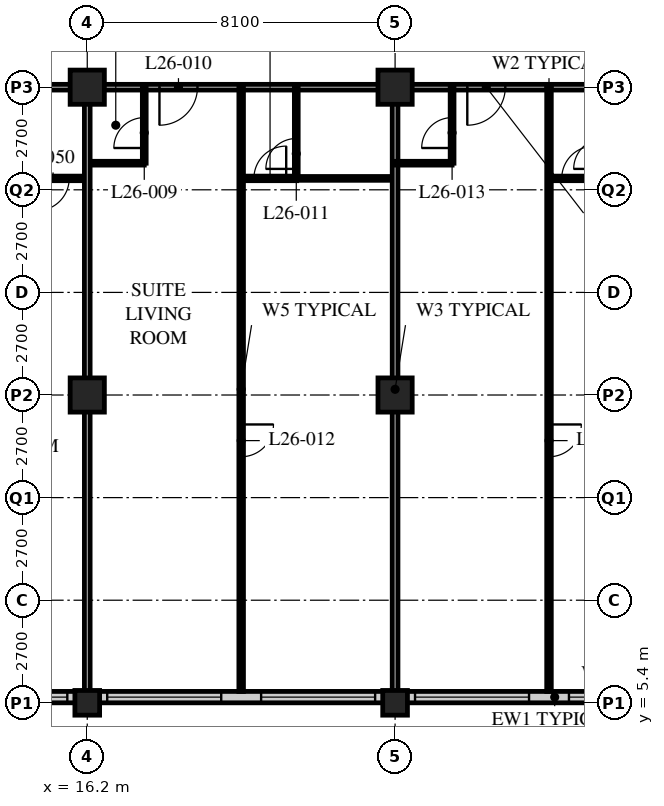
"""IFC4 building model, lengths in metres.
Left out: names, types, materials, properties, quantities, classifications, styles, units other than length and angle.
Written with IfcOpenShell. Run it as: python <this file> out.ifc"""

import sys

from ifc_helpers import new_model, si_unit, direction, frame, frame_2d, origin, origin_2d, place, context, subcontext, project, spatial, rectangle, hollow_rectangle, extrude, element, fill, save


model = new_model("IFC4")
c1 = context("Model", 3, precision=1e-05, world=origin(), true_north=direction((0.0, 1.0)))
c2 = subcontext(c1, "Body", "Model", "MODEL_VIEW")
j1 = project(units=[si_unit("LENGTHUNIT", "METRE"), si_unit("PLANEANGLEUNIT", "RADIAN")], contexts=[c1])
p1 = place(None, origin())
s1 = spatial("IfcSite", under=j1, at=p1, CompositionType="ELEMENT")
p2 = place(p1, origin())
s2 = spatial("IfcBuilding", under=s1, at=p2, CompositionType="ELEMENT")
p3 = place(p2, frame((0.0, 0.0, 106.8)))
s3 = spatial("IfcBuildingStorey", under=s2, at=p3, CompositionType="ELEMENT", Elevation=106.8)
p4 = place(p3, frame((16.2, 5.4, 0.0), z_axis=(0.0, 0.0, 1.0), x_axis=(1.0, 0.0, 0.0)))
e1 = element("IfcColumn", 1, at=p4, inside=s3, PredefinedType="COLUMN", context=c2, shape_type="SweptSolid", body=[
    extrude(hollow_rectangle(XDim=0.65, YDim=0.65, WallThickness=0.055, at=origin_2d()), origin(), (0.0, 0.0, 1.0), 3.4),
])
for number, where, z_axis, x_axis in (
    (2, (16.2, 13.5, 0.0), (0.0, 0.0, 1.0), (1.0, 0.0, 0.0)),
    (3, (16.2, 21.6, 0.0), (0.0, 0.0, 1.0), (1.0, 0.0, 0.0)),
):
    element("IfcColumn", number, at=place(p3, frame(where, z_axis=z_axis, x_axis=x_axis)), inside=s3, PredefinedType="COLUMN", context=c2, shape_type="SweptSolid", body=[
        extrude(hollow_rectangle(XDim=0.9, YDim=0.9, WallThickness=0.09, at=origin_2d()), origin(), (0.0, 0.0, 1.0), 3.4),
    ])
p5 = place(p3, frame((24.3, 5.4, 0.0), z_axis=(0.0, 0.0, 1.0), x_axis=(1.0, 0.0, 0.0)))
e4 = element("IfcColumn", 4, at=p5, inside=s3, PredefinedType="COLUMN", context=c2, shape_type="SweptSolid", body=[
    extrude(hollow_rectangle(XDim=0.65, YDim=0.65, WallThickness=0.055, at=origin_2d()), origin(), (0.0, 0.0, 1.0), 3.4),
])
for number, where, z_axis, x_axis in (
    (5, (24.3, 13.5, 0.0), (0.0, 0.0, 1.0), (1.0, 0.0, 0.0)),
    (6, (24.3, 21.6, 0.0), (0.0, 0.0, 1.0), (1.0, 0.0, 0.0)),
):
    element("IfcColumn", number, at=place(p3, frame(where, z_axis=z_axis, x_axis=x_axis)), inside=s3, PredefinedType="COLUMN", context=c2, shape_type="SweptSolid", body=[
        extrude(hollow_rectangle(XDim=0.9, YDim=0.9, WallThickness=0.09, at=origin_2d()), origin(), (0.0, 0.0, 1.0), 3.4),
    ])
p6 = place(p3, frame((8.4, 5.55, 0.0), z_axis=(0.0, 0.0, 1.0), x_axis=(1.0, 0.0, 0.0)))
e7 = element("IfcWall", 7, at=p6, inside=s3, PredefinedType="SOLIDWALL", context=c2, shape_type="SweptSolid", body=[
    extrude(rectangle(XDim=40.2, YDim=0.3, at=frame_2d((20.1, 0.0))), origin(), (0.0, 0.0, 1.0), 3.19),
])
p7 = place(p6, frame((0.225, 0.0, 0.9)))
e8 = element("IfcOpeningElement", 8, at=p7, cuts=e7, PredefinedType="OPENING", context=c2, shape_type="SweptSolid", body=[
    extrude(rectangle(XDim=3.0, YDim=2.0, at=frame_2d((1.5, 1.0))), frame((0.0, 0.16, 0.0), z_axis=(0.0, -1.0, 0.0), x_axis=(1.0, 0.0, 0.0)), (0.0, 0.0, 1.0), 0.32),
])
p8 = place(p6, frame((4.275, 0.0, 0.9)))
e9 = element("IfcOpeningElement", 9, at=p8, cuts=e7, PredefinedType="OPENING", context=c2, shape_type="SweptSolid", body=[
    extrude(rectangle(XDim=3.0, YDim=2.0, at=frame_2d((1.5, 1.0))), frame((0.0, 0.16, 0.0), z_axis=(0.0, -1.0, 0.0), x_axis=(1.0, 0.0, 0.0)), (0.0, 0.0, 1.0), 0.32),
])
p9 = place(p6, frame((8.325, 0.0, 0.9)))
e10 = element("IfcOpeningElement", 10, at=p9, cuts=e7, PredefinedType="OPENING", context=c2, shape_type="SweptSolid", body=[
    extrude(rectangle(XDim=3.0, YDim=2.0, at=frame_2d((1.5, 1.0))), frame((0.0, 0.16, 0.0), z_axis=(0.0, -1.0, 0.0), x_axis=(1.0, 0.0, 0.0)), (0.0, 0.0, 1.0), 0.32),
])
p10 = place(p6, frame((12.375, 0.0, 0.9)))
e11 = element("IfcOpeningElement", 11, at=p10, cuts=e7, PredefinedType="OPENING", context=c2, shape_type="SweptSolid", body=[
    extrude(rectangle(XDim=3.0, YDim=2.0, at=frame_2d((1.5, 1.0))), frame((0.0, 0.16, 0.0), z_axis=(0.0, -1.0, 0.0), x_axis=(1.0, 0.0, 0.0)), (0.0, 0.0, 1.0), 0.32),
])
p11 = place(p6, frame((16.425, 0.0, 0.9)))
e12 = element("IfcOpeningElement", 12, at=p11, cuts=e7, PredefinedType="OPENING", context=c2, shape_type="SweptSolid", body=[
    extrude(rectangle(XDim=3.0, YDim=2.0, at=frame_2d((1.5, 1.0))), frame((0.0, 0.16, 0.0), z_axis=(0.0, -1.0, 0.0), x_axis=(1.0, 0.0, 0.0)), (0.0, 0.0, 1.0), 0.32),
])
p12 = place(p6, frame((20.475, 0.0, 0.9)))
e13 = element("IfcOpeningElement", 13, at=p12, cuts=e7, PredefinedType="OPENING", context=c2, shape_type="SweptSolid", body=[
    extrude(rectangle(XDim=3.0, YDim=2.0, at=frame_2d((1.5, 1.0))), frame((0.0, 0.16, 0.0), z_axis=(0.0, -1.0, 0.0), x_axis=(1.0, 0.0, 0.0)), (0.0, 0.0, 1.0), 0.32),
])
p13 = place(p6, frame((24.525, 0.0, 0.9)))
e14 = element("IfcOpeningElement", 14, at=p13, cuts=e7, PredefinedType="OPENING", context=c2, shape_type="SweptSolid", body=[
    extrude(rectangle(XDim=3.0, YDim=2.0, at=frame_2d((1.5, 1.0))), frame((0.0, 0.16, 0.0), z_axis=(0.0, -1.0, 0.0), x_axis=(1.0, 0.0, 0.0)), (0.0, 0.0, 1.0), 0.32),
])
p14 = place(p6, frame((28.575, 0.0, 0.9)))
e15 = element("IfcOpeningElement", 15, at=p14, cuts=e7, PredefinedType="OPENING", context=c2, shape_type="SweptSolid", body=[
    extrude(rectangle(XDim=3.0, YDim=2.0, at=frame_2d((1.5, 1.0))), frame((0.0, 0.16, 0.0), z_axis=(0.0, -1.0, 0.0), x_axis=(1.0, 0.0, 0.0)), (0.0, 0.0, 1.0), 0.32),
])
p15 = place(p6, frame((32.625, 0.0, 0.9)))
e16 = element("IfcOpeningElement", 16, at=p15, cuts=e7, PredefinedType="OPENING", context=c2, shape_type="SweptSolid", body=[
    extrude(rectangle(XDim=3.0, YDim=2.0, at=frame_2d((1.5, 1.0))), frame((0.0, 0.16, 0.0), z_axis=(0.0, -1.0, 0.0), x_axis=(1.0, 0.0, 0.0)), (0.0, 0.0, 1.0), 0.32),
])
p16 = place(p6, frame((36.675, 0.0, 0.9)))
e17 = element("IfcOpeningElement", 17, at=p16, cuts=e7, PredefinedType="OPENING", context=c2, shape_type="SweptSolid", body=[
    extrude(rectangle(XDim=3.0, YDim=2.0, at=frame_2d((1.5, 1.0))), frame((0.0, 0.16, 0.0), z_axis=(0.0, -1.0, 0.0), x_axis=(1.0, 0.0, 0.0)), (0.0, 0.0, 1.0), 0.32),
])
p17 = place(p3, frame((12.15, 21.6, 0.0), z_axis=(0.0, 0.0, 1.0), x_axis=(1.0, 0.0, 0.0)))
e18 = element("IfcWall", 18, at=p17, inside=s3, PredefinedType="PARTITIONING", context=c2, shape_type="SweptSolid", body=[
    extrude(rectangle(XDim=32.4, YDim=0.15, at=frame_2d((16.2, 0.0))), origin(), (0.0, 0.0, 1.0), 2.578),
])
p18 = place(p17, frame((5.95, 0.0, 0.0)))
e19 = element("IfcOpeningElement", 19, at=p18, cuts=e18, PredefinedType="OPENING", context=c2, shape_type="SweptSolid", body=[
    extrude(rectangle(XDim=1.0, YDim=2.1, at=frame_2d((0.5, 1.05))), frame((0.0, 0.085, 0.0), z_axis=(0.0, -1.0, 0.0), x_axis=(1.0, 0.0, 0.0)), (0.0, 0.0, 1.0), 0.17),
])
p19 = place(p17, frame((14.05, 0.0, 0.0)))
e20 = element("IfcOpeningElement", 20, at=p19, cuts=e18, PredefinedType="OPENING", context=c2, shape_type="SweptSolid", body=[
    extrude(rectangle(XDim=1.0, YDim=2.1, at=frame_2d((0.5, 1.05))), frame((0.0, 0.085, 0.0), z_axis=(0.0, -1.0, 0.0), x_axis=(1.0, 0.0, 0.0)), (0.0, 0.0, 1.0), 0.17),
])
p20 = place(p17, frame((22.15, 0.0, 0.0)))
e21 = element("IfcOpeningElement", 21, at=p20, cuts=e18, PredefinedType="OPENING", context=c2, shape_type="SweptSolid", body=[
    extrude(rectangle(XDim=1.0, YDim=2.1, at=frame_2d((0.5, 1.05))), frame((0.0, 0.085, 0.0), z_axis=(0.0, -1.0, 0.0), x_axis=(1.0, 0.0, 0.0)), (0.0, 0.0, 1.0), 0.17),
])
p21 = place(p17, frame((1.525, 0.0, 0.0)))
e22 = element("IfcOpeningElement", 22, at=p21, cuts=e18, PredefinedType="OPENING", context=c2, shape_type="SweptSolid", body=[
    extrude(rectangle(XDim=1.0, YDim=2.1, at=frame_2d((0.5, 1.05))), frame((0.0, 0.085, 0.0), z_axis=(0.0, -1.0, 0.0), x_axis=(1.0, 0.0, 0.0)), (0.0, 0.0, 1.0), 0.17),
])
p22 = place(p17, frame((29.875, 0.0, 0.0)))
e23 = element("IfcOpeningElement", 23, at=p22, cuts=e18, PredefinedType="OPENING", context=c2, shape_type="SweptSolid", body=[
    extrude(rectangle(XDim=1.0, YDim=2.1, at=frame_2d((0.5, 1.05))), frame((0.0, 0.085, 0.0), z_axis=(0.0, -1.0, 0.0), x_axis=(1.0, 0.0, 0.0)), (0.0, 0.0, 1.0), 0.17),
])
p23 = place(p3, frame((16.2, 19.6, 0.0), z_axis=(0.0, 0.0, 1.0), x_axis=(1.0, 0.0, 0.0)))
e24 = element("IfcWall", 24, at=p23, inside=s3, PredefinedType="PARTITIONING", context=c2, shape_type="SweptSolid", body=[
    extrude(rectangle(XDim=1.5, YDim=0.1, at=frame_2d((0.75, 0.0))), origin(), (0.0, 0.0, 1.0), 3.19),
])
p24 = place(p3, frame((17.7, 21.6, 0.0), z_axis=(0.0, 0.0, 1.0), x_axis=(0.0, -1.0, 0.0)))
e25 = element("IfcWall", 25, at=p24, inside=s3, PredefinedType="PARTITIONING", context=c2, shape_type="SweptSolid", body=[
    extrude(rectangle(XDim=2.0, YDim=0.1, at=frame_2d((1.0, 0.0))), origin(), (0.0, 0.0, 1.0), 3.19),
])
p25 = place(p24, frame((0.8, 0.0, 0.0)))
e26 = element("IfcOpeningElement", 26, at=p25, cuts=e25, PredefinedType="OPENING", context=c2, shape_type="SweptSolid", body=[
    extrude(rectangle(XDim=0.8, YDim=2.1, at=frame_2d((0.4, 1.05))), frame((0.0, 0.06, 0.0), z_axis=(0.0, -1.0, 0.0), x_axis=(1.0, 0.0, 0.0)), (0.0, 0.0, 1.0), 0.12),
])
p26 = place(p3, frame((21.7, 19.2, 0.0), z_axis=(0.0, 0.0, 1.0), x_axis=(1.0, 0.0, 0.0)))
e27 = element("IfcWall", 27, at=p26, inside=s3, PredefinedType="PARTITIONING", context=c2, shape_type="SweptSolid", body=[
    extrude(rectangle(XDim=2.6, YDim=0.1, at=frame_2d((1.3, 0.0))), origin(), (0.0, 0.0, 1.0), 3.19),
])
p27 = place(p3, frame((21.7, 21.6, 0.0), z_axis=(0.0, 0.0, 1.0), x_axis=(0.0, -1.0, 0.0)))
e28 = element("IfcWall", 28, at=p27, inside=s3, PredefinedType="PARTITIONING", context=c2, shape_type="SweptSolid", body=[
    extrude(rectangle(XDim=2.4, YDim=0.1, at=frame_2d((1.2, 0.0))), origin(), (0.0, 0.0, 1.0), 3.19),
])
p28 = place(p27, frame((1.35, 0.0, 0.0)))
e29 = element("IfcOpeningElement", 29, at=p28, cuts=e28, PredefinedType="OPENING", context=c2, shape_type="SweptSolid", body=[
    extrude(rectangle(XDim=0.8, YDim=2.1, at=frame_2d((0.4, 1.05))), frame((0.0, 0.06, 0.0), z_axis=(0.0, -1.0, 0.0), x_axis=(1.0, 0.0, 0.0)), (0.0, 0.0, 1.0), 0.12),
])
p29 = place(p3, frame((20.25, 21.6, 0.0), z_axis=(0.0, 0.0, 1.0), x_axis=(0.0, -1.0, 0.0)))
e30 = element("IfcWall", 30, at=p29, inside=s3, PredefinedType="PARTITIONING", context=c2, shape_type="SweptSolid", body=[
    extrude(rectangle(XDim=15.9, YDim=0.12, at=frame_2d((7.95, 0.0))), origin(), (0.0, 0.0, 1.0), 3.19),
])
p30 = place(p29, frame((8.875, 0.0, 0.0)))
e31 = element("IfcOpeningElement", 31, at=p30, cuts=e30, PredefinedType="OPENING", context=c2, shape_type="SweptSolid", body=[
    extrude(rectangle(XDim=0.85, YDim=2.1, at=frame_2d((0.425, 1.05))), frame((0.0, 0.07, 0.0), z_axis=(0.0, -1.0, 0.0), x_axis=(1.0, 0.0, 0.0)), (0.0, 0.0, 1.0), 0.14),
])
p31 = place(p3, frame((24.3, 21.6, 0.0), z_axis=(0.0, 0.0, 1.0), x_axis=(0.0, -1.0, 0.0)))
e32 = element("IfcWall", 32, at=p31, inside=s3, PredefinedType="PARTITIONING", context=c2, shape_type="SweptSolid", body=[
    extrude(rectangle(XDim=15.9, YDim=0.15, at=frame_2d((7.95, 0.0))), origin(), (0.0, 0.0, 1.0), 2.578),
])
p32 = place(p3, frame((24.3, 19.6, 0.0), z_axis=(0.0, 0.0, 1.0), x_axis=(1.0, 0.0, 0.0)))
e33 = element("IfcWall", 33, at=p32, inside=s3, PredefinedType="PARTITIONING", context=c2, shape_type="SweptSolid", body=[
    extrude(rectangle(XDim=1.5, YDim=0.1, at=frame_2d((0.75, 0.0))), origin(), (0.0, 0.0, 1.0), 3.19),
])
p33 = place(p3, frame((25.8, 21.6, 0.0), z_axis=(0.0, 0.0, 1.0), x_axis=(0.0, -1.0, 0.0)))
e34 = element("IfcWall", 34, at=p33, inside=s3, PredefinedType="PARTITIONING", context=c2, shape_type="SweptSolid", body=[
    extrude(rectangle(XDim=2.0, YDim=0.1, at=frame_2d((1.0, 0.0))), origin(), (0.0, 0.0, 1.0), 3.19),
])
p34 = place(p33, frame((0.8, 0.0, 0.0)))
e35 = element("IfcOpeningElement", 35, at=p34, cuts=e34, PredefinedType="OPENING", context=c2, shape_type="SweptSolid", body=[
    extrude(rectangle(XDim=0.8, YDim=2.1, at=frame_2d((0.4, 1.05))), frame((0.0, 0.06, 0.0), z_axis=(0.0, -1.0, 0.0), x_axis=(1.0, 0.0, 0.0)), (0.0, 0.0, 1.0), 0.12),
])
p35 = place(p3, frame((28.35, 21.6, 0.0), z_axis=(0.0, 0.0, 1.0), x_axis=(0.0, -1.0, 0.0)))
e36 = element("IfcWall", 36, at=p35, inside=s3, PredefinedType="PARTITIONING", context=c2, shape_type="SweptSolid", body=[
    extrude(rectangle(XDim=15.9, YDim=0.12, at=frame_2d((7.95, 0.0))), origin(), (0.0, 0.0, 1.0), 3.19),
])
p36 = place(p35, frame((8.875, 0.0, 0.0)))
e37 = element("IfcOpeningElement", 37, at=p36, cuts=e36, PredefinedType="OPENING", context=c2, shape_type="SweptSolid", body=[
    extrude(rectangle(XDim=0.85, YDim=2.1, at=frame_2d((0.425, 1.05))), frame((0.0, 0.07, 0.0), z_axis=(0.0, -1.0, 0.0), x_axis=(1.0, 0.0, 0.0)), (0.0, 0.0, 1.0), 0.14),
])
p37 = place(p3, frame((8.15, 19.2, 0.0), z_axis=(0.0, 0.0, 1.0), x_axis=(1.0, 0.0, 0.0)))
e38 = element("IfcWall", 38, at=p37, inside=s3, PredefinedType="PARTITIONING", context=c2, shape_type="SweptSolid", body=[
    extrude(rectangle(XDim=8.05, YDim=0.12, at=frame_2d((4.025, 0.0))), origin(), (0.0, 0.0, 1.0), 3.19),
])
p38 = place(p37, frame((6.725, 0.0, 0.0)))
e39 = element("IfcOpeningElement", 39, at=p38, cuts=e38, PredefinedType="OPENING", context=c2, shape_type="SweptSolid", body=[
    extrude(rectangle(XDim=0.85, YDim=2.1, at=frame_2d((0.425, 1.05))), frame((0.0, 0.07, 0.0), z_axis=(0.0, -1.0, 0.0), x_axis=(1.0, 0.0, 0.0)), (0.0, 0.0, 1.0), 0.14),
])
p39 = place(p37, frame((2.875, 0.0, 0.0)))
e40 = element("IfcOpeningElement", 40, at=p39, cuts=e38, PredefinedType="OPENING", context=c2, shape_type="SweptSolid", body=[
    extrude(rectangle(XDim=0.85, YDim=2.1, at=frame_2d((0.425, 1.05))), frame((0.0, 0.07, 0.0), z_axis=(0.0, -1.0, 0.0), x_axis=(1.0, 0.0, 0.0)), (0.0, 0.0, 1.0), 0.14),
])
p40 = place(p3, frame((16.2, 21.6, 0.0), z_axis=(0.0, 0.0, 1.0), x_axis=(0.0, -1.0, 0.0)))
e41 = element("IfcWall", 41, at=p40, inside=s3, PredefinedType="PARTITIONING", context=c2, shape_type="SweptSolid", body=[
    extrude(rectangle(XDim=15.9, YDim=0.15, at=frame_2d((7.95, 0.0))), origin(), (0.0, 0.0, 1.0), 2.578),
])
p41 = place(p3, frame((21.71, 19.2, 0.0), z_axis=(0.0, 0.0, 1.0), x_axis=(-1.0, 0.0, 0.0)))
e42 = element("IfcWall", 42, at=p41, inside=s3, PredefinedType="PARTITIONING", context=c2, shape_type="SweptSolid", body=[
    extrude(rectangle(XDim=1.46, YDim=0.12, at=frame_2d((0.73, 0.0))), origin(), (0.0, 0.0, 1.0), 3.19),
])
p42 = place(p41, frame((0.275, 0.0, 0.0)))
e43 = element("IfcOpeningElement", 43, at=p42, cuts=e42, PredefinedType="OPENING", context=c2, shape_type="SweptSolid", body=[
    extrude(rectangle(XDim=0.85, YDim=2.1, at=frame_2d((0.425, 1.05))), frame((0.0, 0.07, 0.0), z_axis=(0.0, -1.0, 0.0), x_axis=(1.0, 0.0, 0.0)), (0.0, 0.0, 1.0), 0.14),
])
p43 = place(p3, frame((29.81, 19.2, 0.0), z_axis=(0.0, 0.0, 1.0), x_axis=(-1.0, 0.0, 0.0)))
e44 = element("IfcWall", 44, at=p43, inside=s3, PredefinedType="PARTITIONING", context=c2, shape_type="SweptSolid", body=[
    extrude(rectangle(XDim=1.46, YDim=0.12, at=frame_2d((0.73, 0.0))), origin(), (0.0, 0.0, 1.0), 3.19),
])
p44 = place(p43, frame((0.275, 0.0, 0.0)))
e45 = element("IfcOpeningElement", 45, at=p44, cuts=e44, PredefinedType="OPENING", context=c2, shape_type="SweptSolid", body=[
    extrude(rectangle(XDim=0.85, YDim=2.1, at=frame_2d((0.425, 1.05))), frame((0.0, 0.07, 0.0), z_axis=(0.0, -1.0, 0.0), x_axis=(1.0, 0.0, 0.0)), (0.0, 0.0, 1.0), 0.14),
])
p45 = place(p8, origin())
e46 = element("IfcWindow", 46, at=p45, inside=s3, PartitioningType="SINGLE_PANEL", PredefinedType="WINDOW", context=c2, shape_type="SweptSolid", body=[
    extrude(rectangle(XDim=3.0, YDim=2.0, at=frame_2d((1.5, 1.0))), frame((0.0, 0.03, 0.0), z_axis=(0.0, -1.0, 0.0), x_axis=(1.0, 0.0, 0.0)), (0.0, 0.0, 1.0), 0.06),
])
fill(e9, e46)
p46 = place(p9, origin())
e47 = element("IfcWindow", 47, at=p46, inside=s3, PartitioningType="SINGLE_PANEL", PredefinedType="WINDOW", context=c2, shape_type="SweptSolid", body=[
    extrude(rectangle(XDim=3.0, YDim=2.0, at=frame_2d((1.5, 1.0))), frame((0.0, 0.03, 0.0), z_axis=(0.0, -1.0, 0.0), x_axis=(1.0, 0.0, 0.0)), (0.0, 0.0, 1.0), 0.06),
])
fill(e10, e47)
p47 = place(p10, origin())
e48 = element("IfcWindow", 48, at=p47, inside=s3, PartitioningType="SINGLE_PANEL", PredefinedType="WINDOW", context=c2, shape_type="SweptSolid", body=[
    extrude(rectangle(XDim=3.0, YDim=2.0, at=frame_2d((1.5, 1.0))), frame((0.0, 0.03, 0.0), z_axis=(0.0, -1.0, 0.0), x_axis=(1.0, 0.0, 0.0)), (0.0, 0.0, 1.0), 0.06),
])
fill(e11, e48)
p48 = place(p11, origin())
e49 = element("IfcWindow", 49, at=p48, inside=s3, PartitioningType="SINGLE_PANEL", PredefinedType="WINDOW", context=c2, shape_type="SweptSolid", body=[
    extrude(rectangle(XDim=3.0, YDim=2.0, at=frame_2d((1.5, 1.0))), frame((0.0, 0.03, 0.0), z_axis=(0.0, -1.0, 0.0), x_axis=(1.0, 0.0, 0.0)), (0.0, 0.0, 1.0), 0.06),
])
fill(e12, e49)
p49 = place(p12, origin())
e50 = element("IfcWindow", 50, at=p49, inside=s3, PartitioningType="SINGLE_PANEL", PredefinedType="WINDOW", context=c2, shape_type="SweptSolid", body=[
    extrude(rectangle(XDim=3.0, YDim=2.0, at=frame_2d((1.5, 1.0))), frame((0.0, 0.03, 0.0), z_axis=(0.0, -1.0, 0.0), x_axis=(1.0, 0.0, 0.0)), (0.0, 0.0, 1.0), 0.06),
])
fill(e13, e50)
p50 = place(p25, origin())
e51 = element("IfcDoor", 51, at=p50, inside=s3, OperationType="SINGLE_SWING_LEFT", PredefinedType="DOOR", context=c2, shape_type="SweptSolid", body=[
    extrude(rectangle(XDim=0.8, YDim=2.1, at=frame_2d((0.4, 1.05))), frame((0.0, 0.025, 0.0), z_axis=(0.0, -1.0, 0.0), x_axis=(1.0, 0.0, 0.0)), (0.0, 0.0, 1.0), 0.05),
])
fill(e26, e51)
p51 = place(p18, origin())
e52 = element("IfcDoor", 52, at=p51, inside=s3, OperationType="SINGLE_SWING_RIGHT", PredefinedType="DOOR", context=c2, shape_type="SweptSolid", body=[
    extrude(rectangle(XDim=1.0, YDim=2.1, at=frame_2d((0.5, 1.05))), frame((0.0, 0.025, 0.0), z_axis=(0.0, -1.0, 0.0), x_axis=(1.0, 0.0, 0.0)), (0.0, 0.0, 1.0), 0.05),
])
fill(e19, e52)
p52 = place(p28, origin())
e53 = element("IfcDoor", 53, at=p52, inside=s3, OperationType="SINGLE_SWING_LEFT", PredefinedType="DOOR", context=c2, shape_type="SweptSolid", body=[
    extrude(rectangle(XDim=0.8, YDim=2.1, at=frame_2d((0.4, 1.05))), frame((0.0, 0.025, 0.0), z_axis=(0.0, -1.0, 0.0), x_axis=(1.0, 0.0, 0.0)), (0.0, 0.0, 1.0), 0.05),
])
fill(e29, e53)
p53 = place(p30, origin())
e54 = element("IfcDoor", 54, at=p53, inside=s3, OperationType="SINGLE_SWING_LEFT", PredefinedType="DOOR", context=c2, shape_type="SweptSolid", body=[
    extrude(rectangle(XDim=0.85, YDim=2.1, at=frame_2d((0.425, 1.05))), frame((0.0, 0.025, 0.0), z_axis=(0.0, -1.0, 0.0), x_axis=(1.0, 0.0, 0.0)), (0.0, 0.0, 1.0), 0.05),
])
fill(e31, e54)
p54 = place(p34, origin())
e55 = element("IfcDoor", 55, at=p54, inside=s3, OperationType="SINGLE_SWING_LEFT", PredefinedType="DOOR", context=c2, shape_type="SweptSolid", body=[
    extrude(rectangle(XDim=0.8, YDim=2.1, at=frame_2d((0.4, 1.05))), frame((0.0, 0.025, 0.0), z_axis=(0.0, -1.0, 0.0), x_axis=(1.0, 0.0, 0.0)), (0.0, 0.0, 1.0), 0.05),
])
fill(e35, e55)
p55 = place(p19, origin())
e56 = element("IfcDoor", 56, at=p55, inside=s3, OperationType="SINGLE_SWING_RIGHT", PredefinedType="DOOR", context=c2, shape_type="SweptSolid", body=[
    extrude(rectangle(XDim=1.0, YDim=2.1, at=frame_2d((0.5, 1.05))), frame((0.0, 0.025, 0.0), z_axis=(0.0, -1.0, 0.0), x_axis=(1.0, 0.0, 0.0)), (0.0, 0.0, 1.0), 0.05),
])
fill(e20, e56)
p56 = place(p36, origin())
e57 = element("IfcDoor", 57, at=p56, inside=s3, OperationType="SINGLE_SWING_LEFT", PredefinedType="DOOR", context=c2, shape_type="SweptSolid", body=[
    extrude(rectangle(XDim=0.85, YDim=2.1, at=frame_2d((0.425, 1.05))), frame((0.0, 0.025, 0.0), z_axis=(0.0, -1.0, 0.0), x_axis=(1.0, 0.0, 0.0)), (0.0, 0.0, 1.0), 0.05),
])
fill(e37, e57)
p57 = place(p38, origin())
e58 = element("IfcDoor", 58, at=p57, inside=s3, OperationType="SINGLE_SWING_RIGHT", PredefinedType="DOOR", context=c2, shape_type="SweptSolid", body=[
    extrude(rectangle(XDim=0.85, YDim=2.1, at=frame_2d((0.425, 1.05))), frame((0.0, 0.025, 0.0), z_axis=(0.0, -1.0, 0.0), x_axis=(1.0, 0.0, 0.0)), (0.0, 0.0, 1.0), 0.05),
])
fill(e39, e58)
p58 = place(p42, origin())
e59 = element("IfcDoor", 59, at=p58, inside=s3, OperationType="SINGLE_SWING_RIGHT", PredefinedType="DOOR", context=c2, shape_type="SweptSolid", body=[
    extrude(rectangle(XDim=0.85, YDim=2.1, at=frame_2d((0.425, 1.05))), frame((0.0, 0.025, 0.0), z_axis=(0.0, -1.0, 0.0), x_axis=(1.0, 0.0, 0.0)), (0.0, 0.0, 1.0), 0.05),
])
fill(e43, e59)
p59 = place(p44, origin())
e60 = element("IfcDoor", 60, at=p59, inside=s3, OperationType="SINGLE_SWING_RIGHT", PredefinedType="DOOR", context=c2, shape_type="SweptSolid", body=[
    extrude(rectangle(XDim=0.85, YDim=2.1, at=frame_2d((0.425, 1.05))), frame((0.0, 0.025, 0.0), z_axis=(0.0, -1.0, 0.0), x_axis=(1.0, 0.0, 0.0)), (0.0, 0.0, 1.0), 0.05),
])
fill(e45, e60)
save(model, sys.argv[1])
